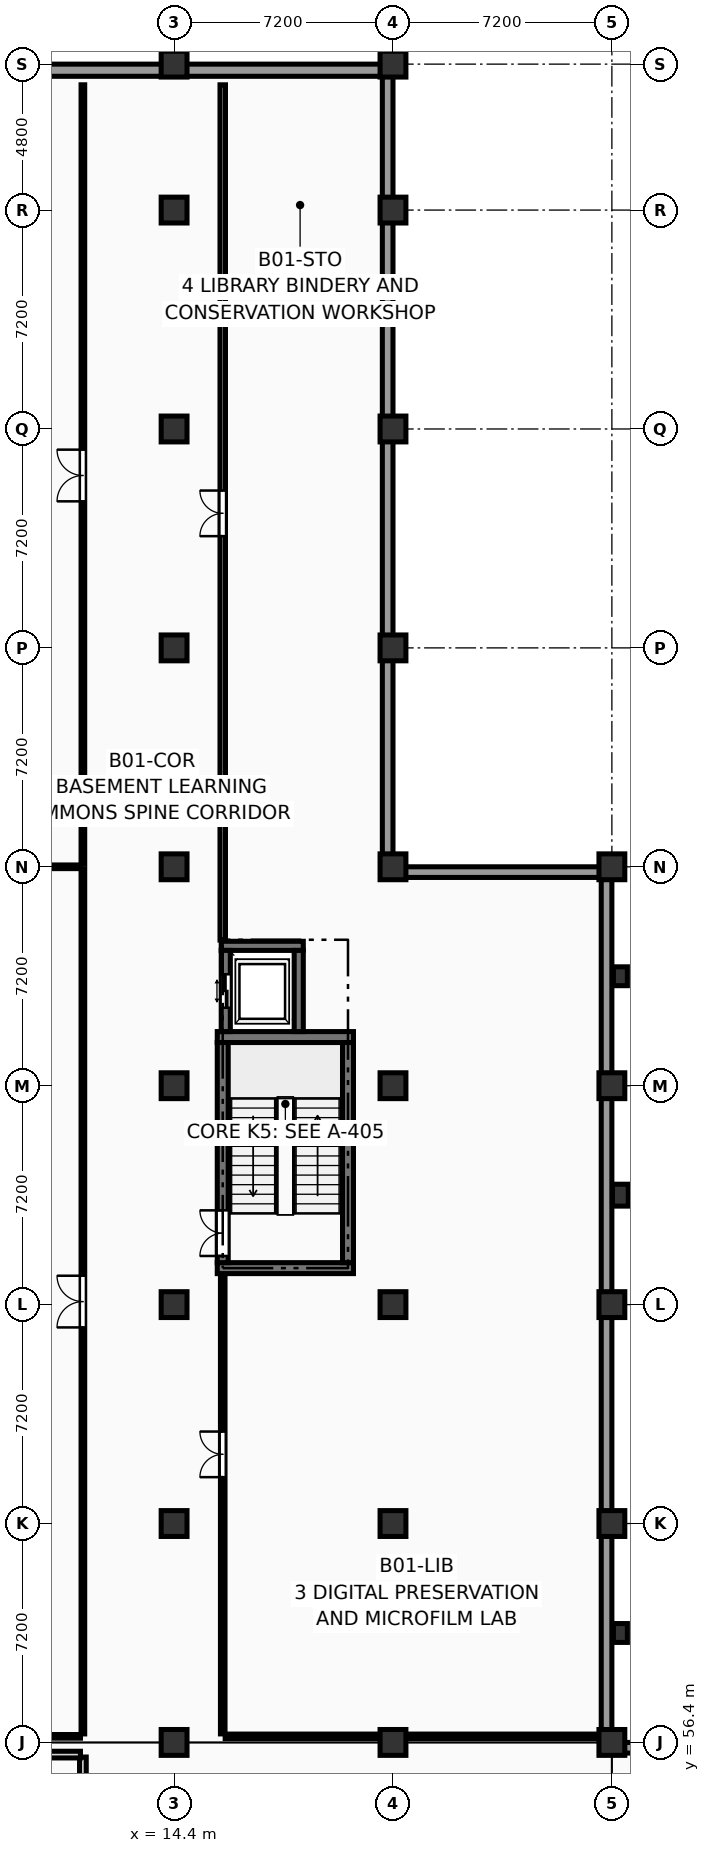
"""IFC4 building model, lengths in metres.
Left out: names, types, materials, properties, quantities, classifications, styles, units other than length and angle.
Written with IfcOpenShell. Run it as: python <this file> out.ifc"""

import sys

from ifc_helpers import new_model, si_unit, direction, frame, frame_2d, origin, origin_2d, place, context, subcontext, project, spatial, rectangle, extrude, element, fill, save


model = new_model("IFC4")
c1 = context("Model", 3, precision=1e-05, world=origin(), true_north=direction((0.0, 1.0)))
c2 = subcontext(c1, "Body", "Model", "MODEL_VIEW")
j1 = project(units=[si_unit("LENGTHUNIT", "METRE"), si_unit("PLANEANGLEUNIT", "RADIAN")], contexts=[c1])
p1 = place(None, origin())
s1 = spatial("IfcSite", under=j1, at=p1, CompositionType="ELEMENT")
p2 = place(p1, origin())
s2 = spatial("IfcBuilding", under=s1, at=p2, CompositionType="ELEMENT")
p3 = place(p2, frame((0.0, 0.0, -4.5)))
s3 = spatial("IfcBuildingStorey", under=s2, at=p3, CompositionType="ELEMENT", Elevation=-4.5)
p4 = place(p3, frame((14.4, 56.4, 0.0), z_axis=(0.0, 0.0, 1.0), x_axis=(1.0, 0.0, 0.0)))
e1 = element("IfcColumn", 1, at=p4, inside=s3, PredefinedType="COLUMN", context=c2, shape_type="SweptSolid", body=[
    extrude(rectangle(XDim=0.85, YDim=0.85, at=origin_2d()), origin(), (0.0, 0.0, 1.0), 4.5),
])
p5 = place(p3, frame((14.4, 63.6, -0.28), z_axis=(0.0, 0.0, 1.0), x_axis=(1.0, 0.0, 0.0)))
e2 = element("IfcColumn", 2, at=p5, inside=s3, PredefinedType="COLUMN", context=c2, shape_type="SweptSolid", body=[
    extrude(rectangle(XDim=0.85, YDim=0.85, at=origin_2d()), origin(), (0.0, 0.0, 1.0), 4.78),
])
for number, where, z_axis, x_axis in (
    (3, (14.4, 70.8, 0.0), (0.0, 0.0, 1.0), (1.0, 0.0, 0.0)),
    (4, (14.4, 78.0, 0.0), (0.0, 0.0, 1.0), (1.0, 0.0, 0.0)),
):
    element("IfcColumn", number, at=place(p3, frame(where, z_axis=z_axis, x_axis=x_axis)), inside=s3, PredefinedType="COLUMN", context=c2, shape_type="SweptSolid", body=[
        extrude(rectangle(XDim=0.85, YDim=0.85, at=origin_2d()), origin(), (0.0, 0.0, 1.0), 4.5),
    ])
for number, where, z_axis, x_axis in (
    (5, (14.4, 85.2, -0.28), (0.0, 0.0, 1.0), (1.0, 0.0, 0.0)),
    (6, (14.4, 92.4, -0.28), (0.0, 0.0, 1.0), (1.0, 0.0, 0.0)),
    (7, (14.4, 99.6, -0.28), (0.0, 0.0, 1.0), (1.0, 0.0, 0.0)),
    (8, (14.4, 106.8, -0.28), (0.0, 0.0, 1.0), (1.0, 0.0, 0.0)),
    (9, (14.4, 111.6, -0.28), (0.0, 0.0, 1.0), (1.0, 0.0, 0.0)),
):
    element("IfcColumn", number, at=place(p3, frame(where, z_axis=z_axis, x_axis=x_axis)), inside=s3, PredefinedType="COLUMN", context=c2, shape_type="SweptSolid", body=[
        extrude(rectangle(XDim=0.85, YDim=0.85, at=origin_2d()), origin(), (0.0, 0.0, 1.0), 4.78),
    ])
p6 = place(p3, frame((21.6, 56.4, 0.0), z_axis=(0.0, 0.0, 1.0), x_axis=(1.0, 0.0, 0.0)))
e10 = element("IfcColumn", 10, at=p6, inside=s3, PredefinedType="COLUMN", context=c2, shape_type="SweptSolid", body=[
    extrude(rectangle(XDim=0.85, YDim=0.85, at=origin_2d()), origin(), (0.0, 0.0, 1.0), 4.5),
])
p7 = place(p3, frame((21.6, 63.6, -0.28), z_axis=(0.0, 0.0, 1.0), x_axis=(1.0, 0.0, 0.0)))
e11 = element("IfcColumn", 11, at=p7, inside=s3, PredefinedType="COLUMN", context=c2, shape_type="SweptSolid", body=[
    extrude(rectangle(XDim=0.85, YDim=0.85, at=origin_2d()), origin(), (0.0, 0.0, 1.0), 4.78),
])
for number, where, z_axis, x_axis in (
    (12, (21.6, 70.8, 0.0), (0.0, 0.0, 1.0), (1.0, 0.0, 0.0)),
    (13, (21.6, 78.0, 0.0), (0.0, 0.0, 1.0), (1.0, 0.0, 0.0)),
):
    element("IfcColumn", number, at=place(p3, frame(where, z_axis=z_axis, x_axis=x_axis)), inside=s3, PredefinedType="COLUMN", context=c2, shape_type="SweptSolid", body=[
        extrude(rectangle(XDim=0.85, YDim=0.85, at=origin_2d()), origin(), (0.0, 0.0, 1.0), 4.5),
    ])
for number, where, z_axis, x_axis in (
    (14, (21.6, 85.2, -0.28), (0.0, 0.0, 1.0), (1.0, 0.0, 0.0)),
    (15, (21.6, 92.4, -0.28), (0.0, 0.0, 1.0), (1.0, 0.0, 0.0)),
    (16, (21.6, 99.6, -0.28), (0.0, 0.0, 1.0), (1.0, 0.0, 0.0)),
    (17, (21.6, 106.8, -0.28), (0.0, 0.0, 1.0), (1.0, 0.0, 0.0)),
    (18, (21.6, 111.6, -0.28), (0.0, 0.0, 1.0), (1.0, 0.0, 0.0)),
):
    element("IfcColumn", number, at=place(p3, frame(where, z_axis=z_axis, x_axis=x_axis)), inside=s3, PredefinedType="COLUMN", context=c2, shape_type="SweptSolid", body=[
        extrude(rectangle(XDim=0.85, YDim=0.85, at=origin_2d()), origin(), (0.0, 0.0, 1.0), 4.78),
    ])
p8 = place(p3, frame((28.8, 56.4, -0.3), z_axis=(0.0, 0.0, 1.0), x_axis=(1.0, 0.0, 0.0)))
e19 = element("IfcColumn", 19, at=p8, inside=s3, PredefinedType="COLUMN", context=c2, shape_type="SweptSolid", body=[
    extrude(rectangle(XDim=0.85, YDim=0.85, at=origin_2d()), origin(), (0.0, 0.0, 1.0), 4.8),
])
for number, where, z_axis, x_axis in (
    (20, (28.8, 63.6, -0.28), (0.0, 0.0, 1.0), (1.0, 0.0, 0.0)),
    (21, (28.8, 70.8, -0.28), (0.0, 0.0, 1.0), (1.0, 0.0, 0.0)),
    (22, (28.8, 78.0, -0.28), (0.0, 0.0, 1.0), (1.0, 0.0, 0.0)),
    (23, (28.8, 85.2, -0.28), (0.0, 0.0, 1.0), (1.0, 0.0, 0.0)),
):
    element("IfcColumn", number, at=place(p3, frame(where, z_axis=z_axis, x_axis=x_axis)), inside=s3, PredefinedType="COLUMN", context=c2, shape_type="SweptSolid", body=[
        extrude(rectangle(XDim=0.85, YDim=0.85, at=origin_2d()), origin(), (0.0, 0.0, 1.0), 4.78),
    ])
p9 = place(p3, frame((29.08, 60.0, -0.28), z_axis=(0.0, 0.0, 1.0), x_axis=(1.0, 0.0, 0.0)))
e24 = element("IfcColumn", 24, at=p9, inside=s3, PredefinedType="PILASTER", context=c2, shape_type="SweptSolid", body=[
    extrude(rectangle(XDim=0.46, YDim=0.62, at=origin_2d()), origin(), (0.0, 0.0, 1.0), 4.78),
])
p10 = place(p3, frame((29.08, 74.4, -0.28), z_axis=(0.0, 0.0, 1.0), x_axis=(1.0, 0.0, 0.0)))
e25 = element("IfcColumn", 25, at=p10, inside=s3, PredefinedType="PILASTER", context=c2, shape_type="SweptSolid", body=[
    extrude(rectangle(XDim=0.52, YDim=0.72, at=origin_2d()), origin(), (0.0, 0.0, 1.0), 4.78),
])
p11 = place(p3, frame((29.08, 81.6, -0.28), z_axis=(0.0, 0.0, 1.0), x_axis=(1.0, 0.0, 0.0)))
e26 = element("IfcColumn", 26, at=p11, inside=s3, PredefinedType="PILASTER", context=c2, shape_type="SweptSolid", body=[
    extrude(rectangle(XDim=0.46, YDim=0.62, at=origin_2d()), origin(), (0.0, 0.0, 1.0), 4.78),
])
p12 = place(p3, frame((0.0, 111.4, -0.3), z_axis=(0.0, 0.0, 1.0), x_axis=(1.0, 0.0, 0.0)))
e27 = element("IfcWall", 27, at=p12, inside=s3, PredefinedType="USERDEFINED", context=c2, shape_type="SweptSolid", body=[
    extrude(rectangle(XDim=21.6, YDim=0.4, at=frame_2d((10.8, 0.0))), origin(), (0.0, 0.0, 1.0), 4.54),
])
p13 = place(p3, frame((21.425, 111.6, -0.3), z_axis=(0.0, 0.0, 1.0), x_axis=(0.0, -1.0, 0.0)))
e28 = element("IfcWall", 28, at=p13, inside=s3, PredefinedType="USERDEFINED", context=c2, shape_type="SweptSolid", body=[
    extrude(rectangle(XDim=26.4, YDim=0.35, at=frame_2d((13.2, 0.0))), origin(), (0.0, 0.0, 1.0), 4.54),
])
p14 = place(p3, frame((21.6, 85.025, -0.3), z_axis=(0.0, 0.0, 1.0), x_axis=(1.0, 0.0, 0.0)))
e29 = element("IfcWall", 29, at=p14, inside=s3, PredefinedType="USERDEFINED", context=c2, shape_type="SweptSolid", body=[
    extrude(rectangle(XDim=7.2, YDim=0.35, at=frame_2d((3.6, 0.0))), origin(), (0.0, 0.0, 1.0), 4.54),
])
p15 = place(p3, frame((28.625, 85.2, -0.3), z_axis=(0.0, 0.0, 1.0), x_axis=(0.0, -1.0, 0.0)))
e30 = element("IfcWall", 30, at=p15, inside=s3, PredefinedType="USERDEFINED", context=c2, shape_type="SweptSolid", body=[
    extrude(rectangle(XDim=28.8, YDim=0.35, at=frame_2d((14.4, 0.0))), origin(), (0.0, 0.0, 1.0), 4.54),
])
p16 = place(p3, frame((28.8, 56.225, -0.3), z_axis=(0.0, 0.0, 1.0), x_axis=(1.0, 0.0, 0.0)))
e31 = element("IfcWall", 31, at=p16, inside=s3, PredefinedType="USERDEFINED", context=c2, shape_type="SweptSolid", body=[
    extrude(rectangle(XDim=36.0, YDim=0.35, at=frame_2d((18.0, 0.0))), origin(), (0.0, 0.0, 1.0), 4.54),
])
for number, where, z_axis, x_axis in (
    (32, (15.82, 72.0, -0.3), (0.0, 0.0, 1.0), (1.0, 0.0, 0.0)),
    (33, (15.82, 79.6, -0.3), (0.0, 0.0, 1.0), (1.0, 0.0, 0.0)),
):
    element("IfcWall", number, at=place(p3, frame(where, z_axis=z_axis, x_axis=x_axis)), inside=s3, PredefinedType="SHEAR", context=c2, shape_type="SweptSolid", body=[
        extrude(rectangle(XDim=4.48, YDim=0.36, at=frame_2d((2.24, 0.0))), origin(), (0.0, 0.0, 1.0), 4.54),
    ])
p17 = place(p3, frame((16.0, 72.18, -0.3), z_axis=(0.0, 0.0, 1.0), x_axis=(0.0, 1.0, 0.0)))
e34 = element("IfcWall", 34, at=p17, inside=s3, PredefinedType="SHEAR", context=c2, shape_type="SweptSolid", body=[
    extrude(rectangle(XDim=7.24, YDim=0.36, at=frame_2d((3.62, 0.0))), origin(), (0.0, 0.0, 1.0), 4.54),
])
p18 = place(p17, frame((0.22, 0.0, 0.3)))
e35 = element("IfcOpeningElement", 35, at=p18, cuts=e34, PredefinedType="OPENING", context=c2, shape_type="SweptSolid", body=[
    extrude(rectangle(XDim=1.5, YDim=2.2, at=frame_2d((0.75, 1.1))), frame((0.0, 0.192, 0.0), z_axis=(0.0, -1.0, 0.0), x_axis=(1.0, 0.0, 0.0)), (0.0, 0.0, 1.0), 0.384),
])
p19 = place(p3, frame((20.12, 72.18, -0.3), z_axis=(0.0, 0.0, 1.0), x_axis=(0.0, 1.0, 0.0)))
e36 = element("IfcWall", 36, at=p19, inside=s3, PredefinedType="SHEAR", context=c2, shape_type="SweptSolid", body=[
    extrude(rectangle(XDim=7.24, YDim=0.36, at=frame_2d((3.62, 0.0))), origin(), (0.0, 0.0, 1.0), 4.54),
])
p20 = place(p3, frame((15.95, 82.6, -1.6), z_axis=(0.0, 0.0, 1.0), x_axis=(1.0, 0.0, 0.0)))
e37 = element("IfcWall", 37, at=p20, inside=s3, PredefinedType="SHEAR", context=c2, shape_type="SweptSolid", body=[
    extrude(rectangle(XDim=2.7, YDim=0.3, at=frame_2d((1.35, 0.0))), origin(), (0.0, 0.0, 1.0), 5.84),
])
p21 = place(p3, frame((16.1, 79.78, -1.6), z_axis=(0.0, 0.0, 1.0), x_axis=(0.0, 1.0, 0.0)))
e38 = element("IfcWall", 38, at=p21, inside=s3, PredefinedType="SHEAR", context=c2, shape_type="SweptSolid", body=[
    extrude(rectangle(XDim=2.67, YDim=0.3, at=frame_2d((1.335, 0.0))), origin(), (0.0, 0.0, 1.0), 5.84),
])
p22 = place(p21, frame((0.785, 0.0, 1.6)))
e39 = element("IfcOpeningElement", 39, at=p22, cuts=e38, PredefinedType="OPENING", context=c2, shape_type="SweptSolid", body=[
    extrude(rectangle(XDim=1.1, YDim=2.2, at=frame_2d((0.55, 1.1))), frame((0.0, 0.162, 0.0), z_axis=(0.0, -1.0, 0.0), x_axis=(1.0, 0.0, 0.0)), (0.0, 0.0, 1.0), 0.324),
])
p23 = place(p3, frame((18.5, 79.78, -1.6), z_axis=(0.0, 0.0, 1.0), x_axis=(0.0, 1.0, 0.0)))
e40 = element("IfcWall", 40, at=p23, inside=s3, PredefinedType="SHEAR", context=c2, shape_type="SweptSolid", body=[
    extrude(rectangle(XDim=2.67, YDim=0.3, at=frame_2d((1.335, 0.0))), origin(), (0.0, 0.0, 1.0), 5.84),
])
p24 = place(p3, frame((11.4, 42.08, 0.0), z_axis=(0.0, 0.0, 1.0), x_axis=(0.0, 1.0, 0.0)))
e41 = element("IfcWall", 41, at=p24, inside=s3, PredefinedType="PARTITIONING", context=c2, shape_type="SweptSolid", body=[
    extrude(rectangle(XDim=13.84, YDim=0.22, at=frame_2d((6.92, 0.0))), origin(), (0.0, 0.0, 1.0), 4.225),
])
p25 = place(p24, frame((6.17, 0.0, 0.0)))
e42 = element("IfcOpeningElement", 42, at=p25, cuts=e41, PredefinedType="OPENING", context=c2, shape_type="SweptSolid", body=[
    extrude(rectangle(XDim=1.5, YDim=2.25, at=frame_2d((0.75, 1.125))), frame((0.0, 0.122, 0.0), z_axis=(0.0, -1.0, 0.0), x_axis=(1.0, 0.0, 0.0)), (0.0, 0.0, 1.0), 0.244),
])
p26 = place(p3, frame((0.58, 56.0, 0.0), z_axis=(0.0, 0.0, 1.0), x_axis=(1.0, 0.0, 0.0)))
e43 = element("IfcWall", 43, at=p26, inside=s3, PredefinedType="PARTITIONING", context=c2, shape_type="SweptSolid", body=[
    extrude(rectangle(XDim=10.74, YDim=0.22, at=frame_2d((5.37, 0.0))), origin(), (0.0, 0.0, 1.0), 3.375),
])
p27 = place(p3, frame((0.58, 56.6, 0.0), z_axis=(0.0, 0.0, 1.0), x_axis=(1.0, 0.0, 0.0)))
e44 = element("IfcWall", 44, at=p27, inside=s3, PredefinedType="PARTITIONING", context=c2, shape_type="SweptSolid", body=[
    extrude(rectangle(XDim=10.74, YDim=0.12, at=frame_2d((5.37, 0.0))), origin(), (0.0, 0.0, 1.0), 3.375),
])
p28 = place(p3, frame((11.4, 56.68, 0.0), z_axis=(0.0, 0.0, 1.0), x_axis=(0.0, 1.0, 0.0)))
e45 = element("IfcWall", 45, at=p28, inside=s3, PredefinedType="PARTITIONING", context=c2, shape_type="SweptSolid", body=[
    extrude(rectangle(XDim=28.44, YDim=0.12, at=frame_2d((14.22, 0.0))), origin(), (0.0, 0.0, 1.0), 4.225),
])
p29 = place(p28, frame((13.37, 0.0, 0.0)))
e46 = element("IfcOpeningElement", 46, at=p29, cuts=e45, PredefinedType="OPENING", context=c2, shape_type="SweptSolid", body=[
    extrude(rectangle(XDim=1.7, YDim=2.28, at=frame_2d((0.85, 1.14))), frame((0.0, 0.072, 0.0), z_axis=(0.0, -1.0, 0.0), x_axis=(1.0, 0.0, 0.0)), (0.0, 0.0, 1.0), 0.144),
])
p30 = place(p3, frame((0.58, 85.2, 0.0), z_axis=(0.0, 0.0, 1.0), x_axis=(1.0, 0.0, 0.0)))
e47 = element("IfcWall", 47, at=p30, inside=s3, PredefinedType="PARTITIONING", context=c2, shape_type="SweptSolid", body=[
    extrude(rectangle(XDim=10.74, YDim=0.12, at=frame_2d((5.37, 0.0))), origin(), (0.0, 0.0, 1.0), 3.375),
])
p31 = place(p3, frame((11.4, 85.28, 0.0), z_axis=(0.0, 0.0, 1.0), x_axis=(0.0, 1.0, 0.0)))
e48 = element("IfcWall", 48, at=p31, inside=s3, PredefinedType="PARTITIONING", context=c2, shape_type="SweptSolid", body=[
    extrude(rectangle(XDim=25.64, YDim=0.12, at=frame_2d((12.82, 0.0))), origin(), (0.0, 0.0, 1.0), 4.225),
])
p32 = place(p31, frame((11.94, 0.0, 0.0)))
e49 = element("IfcOpeningElement", 49, at=p32, cuts=e48, PredefinedType="OPENING", context=c2, shape_type="SweptSolid", body=[
    extrude(rectangle(XDim=1.7, YDim=2.28, at=frame_2d((0.85, 1.14))), frame((0.0, 0.072, 0.0), z_axis=(0.0, -1.0, 0.0), x_axis=(1.0, 0.0, 0.0)), (0.0, 0.0, 1.0), 0.144),
])
p33 = place(p3, frame((16.0, 56.68, 0.0), z_axis=(0.0, 0.0, 1.0), x_axis=(0.0, 1.0, 0.0)))
e50 = element("IfcWall", 50, at=p33, inside=s3, PredefinedType="PARTITIONING", context=c2, shape_type="SweptSolid", body=[
    extrude(rectangle(XDim=15.1, YDim=0.15, at=frame_2d((7.55, 0.0))), origin(), (0.0, 0.0, 1.0), 4.225),
])
p34 = place(p33, frame((8.445, 0.0, 0.0)))
e51 = element("IfcOpeningElement", 51, at=p34, cuts=e50, PredefinedType="OPENING", context=c2, shape_type="SweptSolid", body=[
    extrude(rectangle(XDim=1.5, YDim=2.2, at=frame_2d((0.75, 1.1))), frame((0.0, 0.087, 0.0), z_axis=(0.0, -1.0, 0.0), x_axis=(1.0, 0.0, 0.0)), (0.0, 0.0, 1.0), 0.174),
])
p35 = place(p3, frame((16.08, 56.6, 0.0), z_axis=(0.0, 0.0, 1.0), x_axis=(1.0, 0.0, 0.0)))
e52 = element("IfcWall", 52, at=p35, inside=s3, PredefinedType="PARTITIONING", context=c2, shape_type="SweptSolid", body=[
    extrude(rectangle(XDim=12.24, YDim=0.15, at=frame_2d((6.12, 0.0))), origin(), (0.0, 0.0, 1.0), 3.375),
])
p36 = place(p3, frame((16.0, 82.79, 0.0), z_axis=(0.0, 0.0, 1.0), x_axis=(0.0, 1.0, 0.0)))
e53 = element("IfcWall", 53, at=p36, inside=s3, PredefinedType="PARTITIONING", context=c2, shape_type="SweptSolid", body=[
    extrude(rectangle(XDim=28.13, YDim=0.18, at=frame_2d((14.065, 0.0))), origin(), (0.0, 0.0, 1.0), 4.225),
])
p37 = place(p36, frame((13.285, 0.0, 0.0)))
e54 = element("IfcOpeningElement", 54, at=p37, cuts=e53, PredefinedType="OPENING", context=c2, shape_type="SweptSolid", body=[
    extrude(rectangle(XDim=1.5, YDim=2.25, at=frame_2d((0.75, 1.125))), frame((0.0, 0.102, 0.0), z_axis=(0.0, -1.0, 0.0), x_axis=(1.0, 0.0, 0.0)), (0.0, 0.0, 1.0), 0.204),
])
p38 = place(p18, origin())
e55 = element("IfcDoor", 55, at=p38, inside=s3, OperationType="DOUBLE_DOOR_SINGLE_SWING", PredefinedType="DOOR", context=c2, shape_type="SweptSolid", body=[
    extrude(rectangle(XDim=1.5, YDim=2.2, at=frame_2d((0.75, 1.1))), frame((0.0, 0.025, 0.0), z_axis=(0.0, -1.0, 0.0), x_axis=(1.0, 0.0, 0.0)), (0.0, 0.0, 1.0), 0.05),
])
fill(e35, e55)
p39 = place(p22, origin())
e56 = element("IfcDoor", 56, at=p39, inside=s3, OperationType="DOUBLE_DOOR_SLIDING", PredefinedType="DOOR", context=c2, shape_type="SweptSolid", body=[
    extrude(rectangle(XDim=1.1, YDim=2.2, at=frame_2d((0.55, 1.1))), frame((0.0, 0.025, 0.0), z_axis=(0.0, -1.0, 0.0), x_axis=(1.0, 0.0, 0.0)), (0.0, 0.0, 1.0), 0.05),
])
fill(e39, e56)
p40 = place(p29, origin())
e57 = element("IfcDoor", 57, at=p40, inside=s3, OperationType="DOUBLE_DOOR_SINGLE_SWING", PredefinedType="DOOR", context=c2, shape_type="SweptSolid", body=[
    extrude(rectangle(XDim=1.7, YDim=2.28, at=frame_2d((0.85, 1.14))), frame((0.0, 0.025, 0.0), z_axis=(0.0, -1.0, 0.0), x_axis=(1.0, 0.0, 0.0)), (0.0, 0.0, 1.0), 0.05),
])
fill(e46, e57)
p41 = place(p32, origin())
e58 = element("IfcDoor", 58, at=p41, inside=s3, OperationType="DOUBLE_DOOR_SINGLE_SWING", PredefinedType="DOOR", context=c2, shape_type="SweptSolid", body=[
    extrude(rectangle(XDim=1.7, YDim=2.28, at=frame_2d((0.85, 1.14))), frame((0.0, 0.025, 0.0), z_axis=(0.0, -1.0, 0.0), x_axis=(1.0, 0.0, 0.0)), (0.0, 0.0, 1.0), 0.05),
])
fill(e49, e58)
p42 = place(p34, origin())
e59 = element("IfcDoor", 59, at=p42, inside=s3, OperationType="DOUBLE_DOOR_SINGLE_SWING", PredefinedType="DOOR", context=c2, shape_type="SweptSolid", body=[
    extrude(rectangle(XDim=1.5, YDim=2.2, at=frame_2d((0.75, 1.1))), frame((0.0, 0.025, 0.0), z_axis=(0.0, -1.0, 0.0), x_axis=(1.0, 0.0, 0.0)), (0.0, 0.0, 1.0), 0.05),
])
fill(e51, e59)
p43 = place(p37, origin())
e60 = element("IfcDoor", 60, at=p43, inside=s3, OperationType="DOUBLE_DOOR_SINGLE_SWING", PredefinedType="DOOR", context=c2, shape_type="SweptSolid", body=[
    extrude(rectangle(XDim=1.5, YDim=2.25, at=frame_2d((0.75, 1.125))), frame((0.0, 0.025, 0.0), z_axis=(0.0, -1.0, 0.0), x_axis=(1.0, 0.0, 0.0)), (0.0, 0.0, 1.0), 0.05),
])
fill(e54, e60)
save(model, sys.argv[1])
